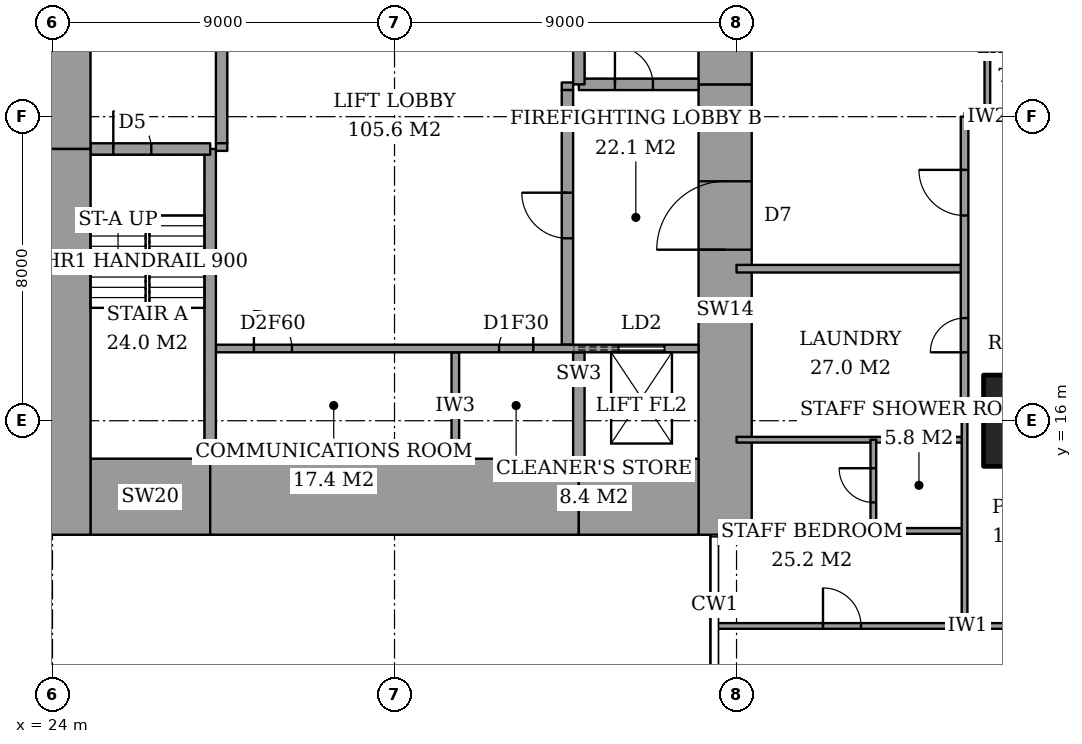
"""IFC4 building model, lengths in metres.
Left out: names, types, materials, properties, quantities, classifications, styles, units other than length and angle.
Written with IfcOpenShell. Run it as: python <this file> out.ifc"""

import sys

from ifc_helpers import new_model, si_unit, direction, frame, frame_2d, origin, origin_2d, place, context, subcontext, project, spatial, rectangle, extrude, element, fill, save


model = new_model("IFC4")
c1 = context("Model", 3, precision=1e-05, world=origin(), true_north=direction((0.0, 1.0)))
c2 = subcontext(c1, "Body", "Model", "MODEL_VIEW")
j1 = project(units=[si_unit("LENGTHUNIT", "METRE"), si_unit("PLANEANGLEUNIT", "RADIAN")], contexts=[c1])
p1 = place(None, origin())
s1 = spatial("IfcSite", under=j1, at=p1, CompositionType="ELEMENT")
p2 = place(p1, origin())
s2 = spatial("IfcBuilding", under=s1, at=p2, CompositionType="ELEMENT")
p3 = place(p2, frame((0.0, 0.0, 262.8)))
s3 = spatial("IfcBuildingStorey", under=s2, at=p3, CompositionType="ELEMENT", Elevation=262.8)
p4 = place(p3, frame((50.0, 16.0, 0.0), z_axis=(0.0, 0.0, 1.0), x_axis=(1.0, 0.0, 0.0)))
e1 = element("IfcColumn", 1, at=p4, inside=s3, PredefinedType="COLUMN", context=c2, shape_type="SweptSolid", body=[
    extrude(rectangle(XDim=3.0, YDim=2.4, at=origin_2d()), origin(), (0.0, 0.0, 1.0), 3.6),
])
p5 = place(p3, frame((25.0, 14.0, 0.0), z_axis=(0.0, 0.0, 1.0), x_axis=(1.0, 0.0, 0.0)))
e2 = element("IfcWall", 2, at=p5, inside=s3, PredefinedType="SHEAR", context=c2, shape_type="SweptSolid", body=[
    extrude(rectangle(XDim=3.15, YDim=2.0, at=frame_2d((1.575, 0.0))), origin(), (0.0, 0.0, 1.0), 3.6),
])
p6 = place(p3, frame((28.15, 14.0, 0.0), z_axis=(0.0, 0.0, 1.0), x_axis=(1.0, 0.0, 0.0)))
e3 = element("IfcWall", 3, at=p6, inside=s3, PredefinedType="SHEAR", context=c2, shape_type="SweptSolid", body=[
    extrude(rectangle(XDim=9.7, YDim=2.0, at=frame_2d((4.85, 0.0))), origin(), (0.0, 0.0, 1.0), 3.6),
])
p7 = place(p3, frame((37.85, 14.0, 0.0), z_axis=(0.0, 0.0, 1.0), x_axis=(1.0, 0.0, 0.0)))
e4 = element("IfcWall", 4, at=p7, inside=s3, PredefinedType="SHEAR", context=c2, shape_type="SweptSolid", body=[
    extrude(rectangle(XDim=3.15, YDim=2.0, at=frame_2d((1.575, 0.0))), origin(), (0.0, 0.0, 1.0), 3.6),
])
p8 = place(p3, frame((24.3, 13.0, 0.0), z_axis=(0.0, 0.0, 1.0), x_axis=(0.0, 1.0, 0.0)))
e5 = element("IfcWall", 5, at=p8, inside=s3, PredefinedType="SHEAR", context=c2, shape_type="SweptSolid", body=[
    extrude(rectangle(XDim=10.15, YDim=1.4, at=frame_2d((5.075, 0.0))), origin(), (0.0, 0.0, 1.0), 3.6),
])
p9 = place(p3, frame((24.3, 23.15, 0.0), z_axis=(0.0, 0.0, 1.0), x_axis=(0.0, 1.0, 0.0)))
e6 = element("IfcWall", 6, at=p9, inside=s3, PredefinedType="SHEAR", context=c2, shape_type="SweptSolid", body=[
    extrude(rectangle(XDim=11.85, YDim=1.4, at=frame_2d((5.925, 0.0))), origin(), (0.0, 0.0, 1.0), 3.6),
])
p10 = place(p3, frame((41.7, 13.0, 0.0), z_axis=(0.0, 0.0, 1.0), x_axis=(0.0, 1.0, 0.0)))
e7 = element("IfcWall", 7, at=p10, inside=s3, PredefinedType="SHEAR", context=c2, shape_type="SweptSolid", body=[
    extrude(rectangle(XDim=11.85, YDim=1.4, at=frame_2d((5.925, 0.0))), origin(), (0.0, 0.0, 1.0), 3.6),
])
p11 = place(p10, frame((7.5, 0.0, 0.0)))
e8 = element("IfcOpeningElement", 8, at=p11, cuts=e7, PredefinedType="OPENING", context=c2, shape_type="SweptSolid", body=[
    extrude(rectangle(XDim=1.8, YDim=2.4, at=frame_2d((0.9, 1.2))), frame((0.0, 0.71, 0.0), z_axis=(0.0, -1.0, 0.0), x_axis=(1.0, 0.0, 0.0)), (0.0, 0.0, 1.0), 1.42),
])
p12 = place(p3, frame((41.7, 24.85, 0.0), z_axis=(0.0, 0.0, 1.0), x_axis=(0.0, 1.0, 0.0)))
e9 = element("IfcWall", 9, at=p12, inside=s3, PredefinedType="SHEAR", context=c2, shape_type="SweptSolid", body=[
    extrude(rectangle(XDim=10.15, YDim=1.4, at=frame_2d((5.075, 0.0))), origin(), (0.0, 0.0, 1.0), 3.6),
])
p13 = place(p3, frame((28.15, 15.0, 0.0), z_axis=(0.0, 0.0, 1.0), x_axis=(0.0, 1.0, 0.0)))
e10 = element("IfcWall", 10, at=p13, inside=s3, PredefinedType="SHEAR", context=c2, shape_type="SweptSolid", body=[
    extrude(rectangle(XDim=8.15, YDim=0.3, at=frame_2d((4.075, 0.0))), origin(), (0.0, 0.0, 1.0), 3.6),
])
p14 = place(p3, frame((25.0, 23.15, 0.0), z_axis=(0.0, 0.0, 1.0), x_axis=(1.0, 0.0, 0.0)))
e11 = element("IfcWall", 11, at=p14, inside=s3, PredefinedType="SHEAR", context=c2, shape_type="SweptSolid", body=[
    extrude(rectangle(XDim=3.15, YDim=0.3, at=frame_2d((1.575, 0.0))), origin(), (0.0, 0.0, 1.0), 3.6),
])
p15 = place(p14, frame((0.6, 0.0, 0.0)))
e12 = element("IfcOpeningElement", 12, at=p15, cuts=e11, PredefinedType="OPENING", context=c2, shape_type="SweptSolid", body=[
    extrude(rectangle(XDim=1.0, YDim=2.1, at=frame_2d((0.5, 1.05))), frame((0.0, 0.16, 0.0), z_axis=(0.0, -1.0, 0.0), x_axis=(1.0, 0.0, 0.0)), (0.0, 0.0, 1.0), 0.32),
])
p16 = place(p3, frame((37.85, 24.85, 0.0), z_axis=(0.0, 0.0, 1.0), x_axis=(0.0, 1.0, 0.0)))
e13 = element("IfcWall", 13, at=p16, inside=s3, PredefinedType="SHEAR", context=c2, shape_type="SweptSolid", body=[
    extrude(rectangle(XDim=8.15, YDim=0.3, at=frame_2d((4.075, 0.0))), origin(), (0.0, 0.0, 1.0), 3.6),
])
p17 = place(p3, frame((37.85, 24.85, 0.0), z_axis=(0.0, 0.0, 1.0), x_axis=(1.0, 0.0, 0.0)))
e14 = element("IfcWall", 14, at=p17, inside=s3, PredefinedType="SHEAR", context=c2, shape_type="SweptSolid", body=[
    extrude(rectangle(XDim=3.15, YDim=0.3, at=frame_2d((1.575, 0.0))), origin(), (0.0, 0.0, 1.0), 3.6),
])
p18 = place(p17, frame((0.95, 0.0, 0.0)))
e15 = element("IfcOpeningElement", 15, at=p18, cuts=e14, PredefinedType="OPENING", context=c2, shape_type="SweptSolid", body=[
    extrude(rectangle(XDim=1.0, YDim=2.1, at=frame_2d((0.5, 1.05))), frame((0.0, 0.16, 0.0), z_axis=(0.0, -1.0, 0.0), x_axis=(1.0, 0.0, 0.0)), (0.0, 0.0, 1.0), 0.32),
])
p19 = place(p3, frame((28.45, 23.3, 0.0), z_axis=(0.0, 0.0, 1.0), x_axis=(0.0, 1.0, 0.0)))
e16 = element("IfcWall", 16, at=p19, inside=s3, PredefinedType="PARTITIONING", context=c2, shape_type="SweptSolid", body=[
    extrude(rectangle(XDim=6.7, YDim=0.3, at=frame_2d((3.35, 0.0))), origin(), (0.0, 0.0, 1.0), 3.6),
])
p20 = place(p19, frame((2.7, 0.0, 0.0)))
e17 = element("IfcOpeningElement", 17, at=p20, cuts=e16, PredefinedType="OPENING", context=c2, shape_type="SweptSolid", body=[
    extrude(rectangle(XDim=1.2, YDim=2.1, at=frame_2d((0.6, 1.05))), frame((0.0, 0.16, 0.0), z_axis=(0.0, -1.0, 0.0), x_axis=(1.0, 0.0, 0.0)), (0.0, 0.0, 1.0), 0.32),
])
p21 = place(p3, frame((37.55, 18.0, 0.0), z_axis=(0.0, 0.0, 1.0), x_axis=(0.0, 1.0, 0.0)))
e18 = element("IfcWall", 18, at=p21, inside=s3, PredefinedType="PARTITIONING", context=c2, shape_type="SweptSolid", body=[
    extrude(rectangle(XDim=6.7, YDim=0.3, at=frame_2d((3.35, 0.0))), origin(), (0.0, 0.0, 1.0), 3.6),
])
p22 = place(p21, frame((2.8, 0.0, 0.0)))
e19 = element("IfcOpeningElement", 19, at=p22, cuts=e18, PredefinedType="OPENING", context=c2, shape_type="SweptSolid", body=[
    extrude(rectangle(XDim=1.2, YDim=2.1, at=frame_2d((0.6, 1.05))), frame((0.0, 0.16, 0.0), z_axis=(0.0, -1.0, 0.0), x_axis=(1.0, 0.0, 0.0)), (0.0, 0.0, 1.0), 0.32),
])
p23 = place(p3, frame((41.439, 10.6, 0.0), z_axis=(0.0, 0.0, 1.0), x_axis=(1.0, 0.0, 0.0)))
e20 = element("IfcWall", 20, at=p23, inside=s3, PredefinedType="PARTITIONING", context=c2, shape_type="SweptSolid", body=[
    extrude(rectangle(XDim=14.761, YDim=0.15, at=frame_2d((7.38, 0.0))), origin(), (0.0, 0.0, 1.0), 3.35),
])
p24 = place(p23, frame((10.761, 0.0, 0.0)))
e21 = element("IfcOpeningElement", 21, at=p24, cuts=e20, PredefinedType="OPENING", context=c2, shape_type="SweptSolid", body=[
    extrude(rectangle(XDim=1.0, YDim=2.1, at=frame_2d((0.5, 1.05))), frame((0.0, 0.085, 0.0), z_axis=(0.0, -1.0, 0.0), x_axis=(1.0, 0.0, 0.0)), (0.0, 0.0, 1.0), 0.17),
])
p25 = place(p23, frame((13.061, 0.0, 0.0)))
e22 = element("IfcOpeningElement", 22, at=p25, cuts=e20, PredefinedType="OPENING", context=c2, shape_type="SweptSolid", body=[
    extrude(rectangle(XDim=1.0, YDim=2.1, at=frame_2d((0.5, 1.05))), frame((0.0, 0.085, 0.0), z_axis=(0.0, -1.0, 0.0), x_axis=(1.0, 0.0, 0.0)), (0.0, 0.0, 1.0), 0.17),
])
p26 = place(p23, frame((7.911, 0.0, 0.0)))
e23 = element("IfcOpeningElement", 23, at=p26, cuts=e20, PredefinedType="OPENING", context=c2, shape_type="SweptSolid", body=[
    extrude(rectangle(XDim=0.9, YDim=2.1, at=frame_2d((0.45, 1.05))), frame((0.0, 0.085, 0.0), z_axis=(0.0, -1.0, 0.0), x_axis=(1.0, 0.0, 0.0)), (0.0, 0.0, 1.0), 0.17),
])
p27 = place(p23, frame((2.836, 0.0, 0.0)))
e24 = element("IfcOpeningElement", 24, at=p27, cuts=e20, PredefinedType="OPENING", context=c2, shape_type="SweptSolid", body=[
    extrude(rectangle(XDim=1.0, YDim=2.1, at=frame_2d((0.5, 1.05))), frame((0.0, 0.085, 0.0), z_axis=(0.0, -1.0, 0.0), x_axis=(1.0, 0.0, 0.0)), (0.0, 0.0, 1.0), 0.17),
])
p28 = place(p3, frame((45.6, 13.1, 0.0), z_axis=(0.0, 0.0, 1.0), x_axis=(1.0, 0.0, 0.0)))
e25 = element("IfcWall", 25, at=p28, inside=s3, PredefinedType="PARTITIONING", context=c2, shape_type="SweptSolid", body=[
    extrude(rectangle(XDim=2.4, YDim=0.15, at=frame_2d((1.2, 0.0))), origin(), (0.0, 0.0, 1.0), 3.35),
])
p29 = place(p3, frame((42.0, 15.5, 0.0), z_axis=(0.0, 0.0, 1.0), x_axis=(1.0, 0.0, 0.0)))
e26 = element("IfcWall", 26, at=p29, inside=s3, PredefinedType="PARTITIONING", context=c2, shape_type="SweptSolid", body=[
    extrude(rectangle(XDim=6.0, YDim=0.15, at=frame_2d((3.0, 0.0))), origin(), (0.0, 0.0, 1.0), 3.35),
])
p30 = place(p3, frame((48.0, 16.05, 0.0), z_axis=(0.0, 0.0, 1.0), x_axis=(1.0, 0.0, 0.0)))
e27 = element("IfcWall", 27, at=p30, inside=s3, PredefinedType="PARTITIONING", context=c2, shape_type="SweptSolid", body=[
    extrude(rectangle(XDim=0.5, YDim=0.15, at=frame_2d((0.25, 0.0))), origin(), (0.0, 0.0, 1.0), 2.634),
])
p31 = place(p3, frame((42.0, 20.0, 0.0), z_axis=(0.0, 0.0, 1.0), x_axis=(1.0, 0.0, 0.0)))
e28 = element("IfcWall", 28, at=p31, inside=s3, PredefinedType="PARTITIONING", context=c2, shape_type="SweptSolid", body=[
    extrude(rectangle(XDim=6.0, YDim=0.2, at=frame_2d((3.0, 0.0))), origin(), (0.0, 0.0, 1.0), 3.35),
])
p32 = place(p3, frame((48.0, 24.0, 0.0), z_axis=(0.0, 0.0, 1.0), x_axis=(1.0, 0.0, 0.0)))
e29 = element("IfcWall", 29, at=p32, inside=s3, PredefinedType="PARTITIONING", context=c2, shape_type="SweptSolid", body=[
    extrude(rectangle(XDim=1.2, YDim=0.2, at=frame_2d((0.6, 0.0))), origin(), (0.0, 0.0, 1.0), 3.35),
])
p33 = place(p3, frame((48.6, 25.6, 0.0), z_axis=(0.0, 0.0, 1.0), x_axis=(1.0, 0.0, 0.0)))
e30 = element("IfcWall", 30, at=p33, inside=s3, PredefinedType="PARTITIONING", context=c2, shape_type="SweptSolid", body=[
    extrude(rectangle(XDim=8.4, YDim=0.15, at=frame_2d((4.2, 0.0))), origin(), (0.0, 0.0, 1.0), 3.35),
])
p34 = place(p33, frame((3.75, 0.0, 0.0)))
e31 = element("IfcOpeningElement", 31, at=p34, cuts=e30, PredefinedType="OPENING", context=c2, shape_type="SweptSolid", body=[
    extrude(rectangle(XDim=0.9, YDim=2.1, at=frame_2d((0.45, 1.05))), frame((0.0, 0.085, 0.0), z_axis=(0.0, -1.0, 0.0), x_axis=(1.0, 0.0, 0.0)), (0.0, 0.0, 1.0), 0.17),
])
p35 = place(p3, frame((45.6, 13.1, 0.0), z_axis=(0.0, 0.0, 1.0), x_axis=(0.0, 1.0, 0.0)))
e32 = element("IfcWall", 32, at=p35, inside=s3, PredefinedType="PARTITIONING", context=c2, shape_type="SweptSolid", body=[
    extrude(rectangle(XDim=2.4, YDim=0.15, at=frame_2d((1.2, 0.0))), origin(), (0.0, 0.0, 1.0), 3.35),
])
p36 = place(p35, frame((0.75, 0.0, 0.0)))
e33 = element("IfcOpeningElement", 33, at=p36, cuts=e32, PredefinedType="OPENING", context=c2, shape_type="SweptSolid", body=[
    extrude(rectangle(XDim=0.9, YDim=2.1, at=frame_2d((0.45, 1.05))), frame((0.0, 0.085, 0.0), z_axis=(0.0, -1.0, 0.0), x_axis=(1.0, 0.0, 0.0)), (0.0, 0.0, 1.0), 0.17),
])
p37 = place(p3, frame((48.0, 16.5, 0.0), z_axis=(0.0, 0.0, 1.0), x_axis=(0.0, 1.0, 0.0)))
e34 = element("IfcWall", 34, at=p37, inside=s3, PredefinedType="PARTITIONING", context=c2, shape_type="SweptSolid", body=[
    extrude(rectangle(XDim=7.5, YDim=0.2, at=frame_2d((3.75, 0.0))), origin(), (0.0, 0.0, 1.0), 3.35),
])
p38 = place(p37, frame((4.9, 0.0, 0.0)))
e35 = element("IfcOpeningElement", 35, at=p38, cuts=e34, PredefinedType="OPENING", context=c2, shape_type="SweptSolid", body=[
    extrude(rectangle(XDim=1.2, YDim=2.4, at=frame_2d((0.6, 1.2))), frame((0.0, 0.11, 0.0), z_axis=(0.0, -1.0, 0.0), x_axis=(1.0, 0.0, 0.0)), (0.0, 0.0, 1.0), 0.22),
])
p39 = place(p37, frame((1.3, 0.0, 0.0)))
e36 = element("IfcOpeningElement", 36, at=p39, cuts=e34, PredefinedType="OPENING", context=c2, shape_type="SweptSolid", body=[
    extrude(rectangle(XDim=0.9, YDim=2.1, at=frame_2d((0.45, 1.05))), frame((0.0, 0.11, 0.0), z_axis=(0.0, -1.0, 0.0), x_axis=(1.0, 0.0, 0.0)), (0.0, 0.0, 1.0), 0.22),
])
p40 = place(p3, frame((48.0, 10.6, 0.0), z_axis=(0.0, 0.0, 1.0), x_axis=(0.0, 1.0, 0.0)))
e37 = element("IfcWall", 37, at=p40, inside=s3, PredefinedType="PARTITIONING", context=c2, shape_type="SweptSolid", body=[
    extrude(rectangle(XDim=5.9, YDim=0.15, at=frame_2d((2.95, 0.0))), origin(), (0.0, 0.0, 1.0), 3.35),
])
p41 = place(p3, frame((48.6, 24.0, 0.0), z_axis=(0.0, 0.0, 1.0), x_axis=(0.0, 1.0, 0.0)))
e38 = element("IfcWall", 38, at=p41, inside=s3, PredefinedType="PARTITIONING", context=c2, shape_type="SweptSolid", body=[
    extrude(rectangle(XDim=1.6, YDim=0.15, at=frame_2d((0.8, 0.0))), origin(), (0.0, 0.0, 1.0), 3.35),
])
p42 = place(p3, frame((28.3, 17.9, 0.0), z_axis=(0.0, 0.0, 1.0), x_axis=(1.0, 0.0, 0.0)))
e39 = element("IfcWall", 39, at=p42, inside=s3, PredefinedType="PARTITIONING", context=c2, shape_type="SweptSolid", body=[
    extrude(rectangle(XDim=12.7, YDim=0.2, at=frame_2d((6.35, 0.0))), origin(), (0.0, 0.0, 1.0), 3.6),
])
p43 = place(p42, frame((1.0, 0.0, 0.0)))
e40 = element("IfcOpeningElement", 40, at=p43, cuts=e39, PredefinedType="OPENING", context=c2, shape_type="SweptSolid", body=[
    extrude(rectangle(XDim=1.0, YDim=2.1, at=frame_2d((0.5, 1.05))), frame((0.0, 0.11, 0.0), z_axis=(0.0, -1.0, 0.0), x_axis=(1.0, 0.0, 0.0)), (0.0, 0.0, 1.0), 0.22),
])
p44 = place(p42, frame((7.45, 0.0, 0.0)))
e41 = element("IfcOpeningElement", 41, at=p44, cuts=e39, PredefinedType="OPENING", context=c2, shape_type="SweptSolid", body=[
    extrude(rectangle(XDim=0.9, YDim=2.1, at=frame_2d((0.45, 1.05))), frame((0.0, 0.11, 0.0), z_axis=(0.0, -1.0, 0.0), x_axis=(1.0, 0.0, 0.0)), (0.0, 0.0, 1.0), 0.22),
])
p45 = place(p42, frame((10.6, 0.0, 0.0)))
e42 = element("IfcOpeningElement", 42, at=p45, cuts=e39, PredefinedType="OPENING", context=c2, shape_type="SweptSolid", body=[
    extrude(rectangle(XDim=1.2, YDim=2.1, at=frame_2d((0.6, 1.05))), frame((0.0, 0.11, 0.0), z_axis=(0.0, -1.0, 0.0), x_axis=(1.0, 0.0, 0.0)), (0.0, 0.0, 1.0), 0.22),
])
p46 = place(p3, frame((34.6, 15.0, 0.0), z_axis=(0.0, 0.0, 1.0), x_axis=(0.0, 1.0, 0.0)))
e43 = element("IfcWall", 43, at=p46, inside=s3, PredefinedType="PARTITIONING", context=c2, shape_type="SweptSolid", body=[
    extrude(rectangle(XDim=2.8, YDim=0.2, at=frame_2d((1.4, 0.0))), origin(), (0.0, 0.0, 1.0), 3.6),
])
p47 = place(p3, frame((37.85, 15.0, 0.0), z_axis=(0.0, 0.0, 1.0), x_axis=(0.0, 1.0, 0.0)))
e44 = element("IfcWall", 44, at=p47, inside=s3, PredefinedType="SHEAR", context=c2, shape_type="SweptSolid", body=[
    extrude(rectangle(XDim=2.8, YDim=0.3, at=frame_2d((1.4, 0.0))), origin(), (0.0, 0.0, 1.0), 3.6),
])
for number, where, z_axis, x_axis in (
    (45, (28.3, 23.2, 0.0), (0.0, 0.0, 1.0), (1.0, 0.0, 0.0)),
    (46, (37.4, 24.8, 0.0), (0.0, 0.0, 1.0), (1.0, 0.0, 0.0)),
):
    element("IfcWall", number, at=place(p3, frame(where, z_axis=z_axis, x_axis=x_axis)), inside=s3, PredefinedType="PARTITIONING", context=c2, shape_type="SweptSolid", body=[
        extrude(rectangle(XDim=0.3, YDim=0.2, at=frame_2d((0.15, 0.0))), origin(), (0.0, 0.0, 1.0), 3.6),
    ])
p48 = place(p38, origin())
e47 = element("IfcDoor", 47, at=p48, inside=s3, OperationType="SINGLE_SWING_LEFT", PredefinedType="DOOR", context=c2, shape_type="SweptSolid", body=[
    extrude(rectangle(XDim=1.2, YDim=2.4, at=frame_2d((0.6, 1.2))), frame((0.0, 0.025, 0.0), z_axis=(0.0, -1.0, 0.0), x_axis=(1.0, 0.0, 0.0)), (0.0, 0.0, 1.0), 0.05),
])
fill(e35, e47)
p49 = place(p36, origin())
e48 = element("IfcDoor", 48, at=p49, inside=s3, OperationType="SINGLE_SWING_LEFT", PredefinedType="DOOR", context=c2, shape_type="SweptSolid", body=[
    extrude(rectangle(XDim=0.9, YDim=2.1, at=frame_2d((0.45, 1.05))), frame((0.0, 0.025, 0.0), z_axis=(0.0, -1.0, 0.0), x_axis=(1.0, 0.0, 0.0)), (0.0, 0.0, 1.0), 0.05),
])
fill(e33, e48)
p50 = place(p27, origin())
e49 = element("IfcDoor", 49, at=p50, inside=s3, OperationType="SINGLE_SWING_RIGHT", PredefinedType="DOOR", context=c2, shape_type="SweptSolid", body=[
    extrude(rectangle(XDim=1.0, YDim=2.1, at=frame_2d((0.5, 1.05))), frame((0.0, 0.025, 0.0), z_axis=(0.0, -1.0, 0.0), x_axis=(1.0, 0.0, 0.0)), (0.0, 0.0, 1.0), 0.05),
])
fill(e24, e49)
p51 = place(p39, origin())
e50 = element("IfcDoor", 50, at=p51, inside=s3, OperationType="SINGLE_SWING_RIGHT", PredefinedType="DOOR", context=c2, shape_type="SweptSolid", body=[
    extrude(rectangle(XDim=0.9, YDim=2.1, at=frame_2d((0.45, 1.05))), frame((0.0, 0.025, 0.0), z_axis=(0.0, -1.0, 0.0), x_axis=(1.0, 0.0, 0.0)), (0.0, 0.0, 1.0), 0.05),
])
fill(e36, e50)
p52 = place(p15, origin())
e51 = element("IfcDoor", 51, at=p52, inside=s3, OperationType="SINGLE_SWING_RIGHT", PredefinedType="DOOR", context=c2, shape_type="SweptSolid", body=[
    extrude(rectangle(XDim=1.0, YDim=2.1, at=frame_2d((0.5, 1.05))), frame((0.0, 0.025, 0.0), z_axis=(0.0, -1.0, 0.0), x_axis=(1.0, 0.0, 0.0)), (0.0, 0.0, 1.0), 0.05),
])
fill(e12, e51)
p53 = place(p18, origin())
e52 = element("IfcDoor", 52, at=p53, inside=s3, OperationType="SINGLE_SWING_RIGHT", PredefinedType="DOOR", context=c2, shape_type="SweptSolid", body=[
    extrude(rectangle(XDim=1.0, YDim=2.1, at=frame_2d((0.5, 1.05))), frame((0.0, 0.025, 0.0), z_axis=(0.0, -1.0, 0.0), x_axis=(1.0, 0.0, 0.0)), (0.0, 0.0, 1.0), 0.05),
])
fill(e15, e52)
p54 = place(p22, origin())
e53 = element("IfcDoor", 53, at=p54, inside=s3, OperationType="SINGLE_SWING_LEFT", PredefinedType="DOOR", context=c2, shape_type="SweptSolid", body=[
    extrude(rectangle(XDim=1.2, YDim=2.1, at=frame_2d((0.6, 1.05))), frame((0.0, 0.025, 0.0), z_axis=(0.0, -1.0, 0.0), x_axis=(1.0, 0.0, 0.0)), (0.0, 0.0, 1.0), 0.05),
])
fill(e19, e53)
p55 = place(p11, origin())
e54 = element("IfcDoor", 54, at=p55, inside=s3, OperationType="DOUBLE_DOOR_DOUBLE_SWING", PredefinedType="DOOR", context=c2, shape_type="SweptSolid", body=[
    extrude(rectangle(XDim=1.8, YDim=2.4, at=frame_2d((0.9, 1.2))), frame((0.0, 0.025, 0.0), z_axis=(0.0, -1.0, 0.0), x_axis=(1.0, 0.0, 0.0)), (0.0, 0.0, 1.0), 0.05),
])
fill(e8, e54)
p56 = place(p43, origin())
e55 = element("IfcDoor", 55, at=p56, inside=s3, OperationType="SINGLE_SWING_RIGHT", PredefinedType="DOOR", context=c2, shape_type="SweptSolid", body=[
    extrude(rectangle(XDim=1.0, YDim=2.1, at=frame_2d((0.5, 1.05))), frame((0.0, 0.025, 0.0), z_axis=(0.0, -1.0, 0.0), x_axis=(1.0, 0.0, 0.0)), (0.0, 0.0, 1.0), 0.05),
])
fill(e40, e55)
p57 = place(p44, origin())
e56 = element("IfcDoor", 56, at=p57, inside=s3, OperationType="SINGLE_SWING_LEFT", PredefinedType="DOOR", context=c2, shape_type="SweptSolid", body=[
    extrude(rectangle(XDim=0.9, YDim=2.1, at=frame_2d((0.45, 1.05))), frame((0.0, 0.025, 0.0), z_axis=(0.0, -1.0, 0.0), x_axis=(1.0, 0.0, 0.0)), (0.0, 0.0, 1.0), 0.05),
])
fill(e41, e56)
p58 = place(p45, origin())
e57 = element("IfcDoor", 57, at=p58, inside=s3, OperationType="SLIDING_TO_LEFT", PredefinedType="DOOR", context=c2, shape_type="SweptSolid", body=[
    extrude(rectangle(XDim=1.2, YDim=2.1, at=frame_2d((0.6, 1.05))), frame((0.0, 0.025, 0.0), z_axis=(0.0, -1.0, 0.0), x_axis=(1.0, 0.0, 0.0)), (0.0, 0.0, 1.0), 0.05),
])
fill(e42, e57)
save(model, sys.argv[1])
